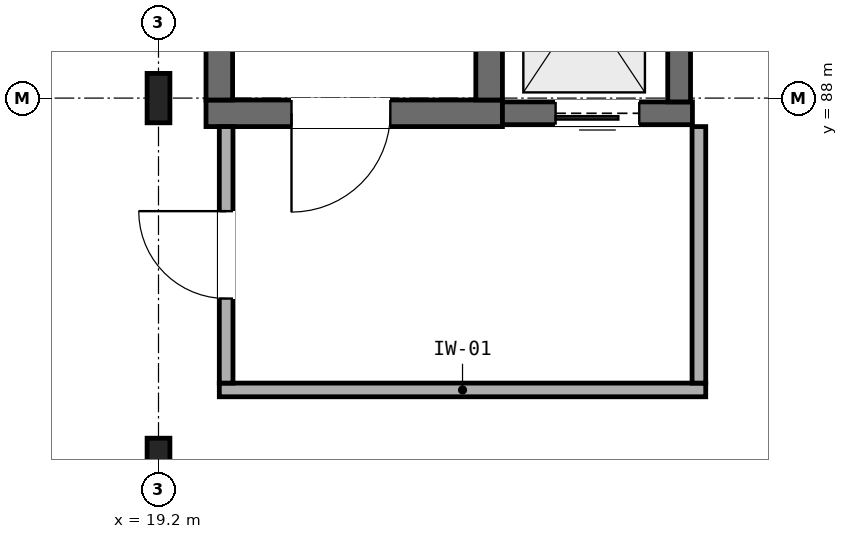
"""IFC4 building model, lengths in metres.
Left out: names, types, materials, properties, quantities, classifications, styles, units other than length and angle.
Written with IfcOpenShell. Run it as: python <this file> out.ifc"""

import sys

from ifc_helpers import new_model, si_unit, direction, frame, frame_2d, origin, origin_2d, place, context, subcontext, project, spatial, rectangle, i_section, extrude, element, fill, save


model = new_model("IFC4")
c1 = context("Model", 3, precision=1e-05, world=origin(), true_north=direction((0.0, 1.0)))
c2 = subcontext(c1, "Body", "Model", "MODEL_VIEW")
j1 = project(units=[si_unit("LENGTHUNIT", "METRE"), si_unit("PLANEANGLEUNIT", "RADIAN")], contexts=[c1])
p1 = place(None, origin())
s1 = spatial("IfcSite", under=j1, at=p1, CompositionType="ELEMENT")
p2 = place(p1, origin())
s2 = spatial("IfcBuilding", under=s1, at=p2, CompositionType="ELEMENT")
p3 = place(p2, frame((0.0, 0.0, -9.8)))
s3 = spatial("IfcBuildingStorey", under=s2, at=p3, CompositionType="ELEMENT", Elevation=-9.8)
for number, where, z_axis, x_axis in (
    (1, (19.2, 83.2, 0.0), (0.0, 0.0, 1.0), (1.0, 0.0, 0.0)),
    (2, (19.2, 88.0, 0.0), (0.0, 0.0, 1.0), (1.0, 0.0, 0.0)),
):
    element("IfcColumn", number, at=place(p3, frame(where, z_axis=z_axis, x_axis=x_axis)), inside=s3, PredefinedType="COLUMN", context=c2, shape_type="SweptSolid", body=[
        extrude(i_section(OverallWidth=0.3, OverallDepth=0.65, WebThickness=0.016, FlangeThickness=0.031, FilletRadius=0.027, at=origin_2d()), origin(), (0.0, 0.0, 1.0), 5.25),
    ])
p4 = place(p3, frame((19.825, 87.8, 0.0), z_axis=(0.0, 0.0, 1.0), x_axis=(1.0, 0.0, 0.0)))
e3 = element("IfcWall", 3, at=p4, inside=s3, PredefinedType="SHEAR", context=c2, shape_type="SweptSolid", body=[
    extrude(rectangle(XDim=3.9, YDim=0.35, at=frame_2d((1.95, 0.0))), origin(), (0.0, 0.0, 1.0), 4.97),
])
p5 = place(p4, frame((1.125, 0.0, 0.0)))
e4 = element("IfcOpeningElement", 4, at=p5, cuts=e3, PredefinedType="OPENING", context=c2, shape_type="SweptSolid", body=[
    extrude(rectangle(XDim=1.3, YDim=2.15, at=frame_2d((0.65, 1.075))), frame((0.0, 0.185, 0.0), z_axis=(0.0, -1.0, 0.0), x_axis=(1.0, 0.0, 0.0)), (0.0, 0.0, 1.0), 0.37),
])
for number, where, z_axis, x_axis in (
    (5, (20.0, 87.975, 0.0), (0.0, 0.0, 1.0), (0.0, 1.0, 0.0)),
    (6, (23.55, 87.975, 0.0), (0.0, 0.0, 1.0), (0.0, 1.0, 0.0)),
):
    element("IfcWall", number, at=place(p3, frame(where, z_axis=z_axis, x_axis=x_axis)), inside=s3, PredefinedType="SHEAR", context=c2, shape_type="SweptSolid", body=[
        extrude(rectangle(XDim=7.6, YDim=0.35, at=frame_2d((3.8, 0.0))), origin(), (0.0, 0.0, 1.0), 4.97),
    ])
p6 = place(p3, frame((23.725, 87.8, 0.0), z_axis=(0.0, 0.0, 1.0), x_axis=(1.0, 0.0, 0.0)))
e7 = element("IfcWall", 7, at=p6, inside=s3, PredefinedType="SHEAR", context=c2, shape_type="SweptSolid", body=[
    extrude(rectangle(XDim=2.5, YDim=0.3, at=frame_2d((1.25, 0.0))), origin(), (0.0, 0.0, 1.0), 4.97),
])
p7 = place(p6, frame((0.7, 0.0, 0.0)))
e8 = element("IfcOpeningElement", 8, at=p7, cuts=e7, PredefinedType="OPENING", context=c2, shape_type="SweptSolid", body=[
    extrude(rectangle(XDim=1.1, YDim=2.1, at=frame_2d((0.55, 1.05))), frame((0.0, 0.16, 0.0), z_axis=(0.0, -1.0, 0.0), x_axis=(1.0, 0.0, 0.0)), (0.0, 0.0, 1.0), 0.32),
])
p8 = place(p3, frame((26.05, 87.95, 0.0), z_axis=(0.0, 0.0, 1.0), x_axis=(0.0, 1.0, 0.0)))
e9 = element("IfcWall", 9, at=p8, inside=s3, PredefinedType="SHEAR", context=c2, shape_type="SweptSolid", body=[
    extrude(rectangle(XDim=2.65, YDim=0.3, at=frame_2d((1.325, 0.0))), origin(), (0.0, 0.0, 1.0), 4.97),
])
p9 = place(p3, frame((20.0, 84.16, 0.0), z_axis=(0.0, 0.0, 1.0), x_axis=(1.0, 0.0, 0.0)))
e10 = element("IfcWall", 10, at=p9, inside=s3, PredefinedType="PARTITIONING", context=c2, shape_type="SweptSolid", body=[
    extrude(rectangle(XDim=6.4, YDim=0.18, at=frame_2d((3.2, 0.0))), origin(), (0.0, 0.0, 1.0), 4.97),
])
p10 = place(p3, frame((20.09, 84.25, 0.0), z_axis=(0.0, 0.0, 1.0), x_axis=(0.0, 1.0, 0.0)))
e11 = element("IfcWall", 11, at=p10, inside=s3, PredefinedType="PARTITIONING", context=c2, shape_type="SweptSolid", body=[
    extrude(rectangle(XDim=3.375, YDim=0.18, at=frame_2d((1.688, 0.0))), origin(), (0.0, 0.0, 1.0), 4.97),
])
p11 = place(p10, frame((1.113, 0.0, 0.0)))
e12 = element("IfcOpeningElement", 12, at=p11, cuts=e11, PredefinedType="OPENING", context=c2, shape_type="SweptSolid", body=[
    extrude(rectangle(XDim=1.15, YDim=2.15, at=frame_2d((0.575, 1.075))), frame((0.0, 0.1, 0.0), z_axis=(0.0, -1.0, 0.0), x_axis=(1.0, 0.0, 0.0)), (0.0, 0.0, 1.0), 0.2),
])
p12 = place(p3, frame((26.31, 84.25, 0.0), z_axis=(0.0, 0.0, 1.0), x_axis=(0.0, 1.0, 0.0)))
e13 = element("IfcWall", 13, at=p12, inside=s3, PredefinedType="PARTITIONING", context=c2, shape_type="SweptSolid", body=[
    extrude(rectangle(XDim=3.375, YDim=0.18, at=frame_2d((1.688, 0.0))), origin(), (0.0, 0.0, 1.0), 4.97),
])
p13 = place(p5, frame((1.3, 0.0, 0.0), z_axis=(0.0, 0.0, 1.0), x_axis=(-1.0, 0.0, 0.0)))
e14 = element("IfcDoor", 14, at=p13, inside=s3, OperationType="SINGLE_SWING_LEFT", PredefinedType="DOOR", context=c2, shape_type="SweptSolid", body=[
    extrude(rectangle(XDim=1.3, YDim=2.15, at=frame_2d((0.65, 1.075))), frame((0.0, 0.025, 0.0), z_axis=(0.0, -1.0, 0.0), x_axis=(1.0, 0.0, 0.0)), (0.0, 0.0, 1.0), 0.05),
])
fill(e4, e14)
p14 = place(p7, frame((1.1, 0.0, 0.0), z_axis=(0.0, 0.0, 1.0), x_axis=(-1.0, 0.0, 0.0)))
e15 = element("IfcDoor", 15, at=p14, inside=s3, OperationType="SLIDING_TO_LEFT", PredefinedType="DOOR", context=c2, shape_type="SweptSolid", body=[
    extrude(rectangle(XDim=1.1, YDim=2.1, at=frame_2d((0.55, 1.05))), frame((0.0, 0.025, 0.0), z_axis=(0.0, -1.0, 0.0), x_axis=(1.0, 0.0, 0.0)), (0.0, 0.0, 1.0), 0.05),
])
fill(e8, e15)
p15 = place(p11, origin())
e16 = element("IfcDoor", 16, at=p15, inside=s3, OperationType="SINGLE_SWING_RIGHT", PredefinedType="DOOR", context=c2, shape_type="SweptSolid", body=[
    extrude(rectangle(XDim=1.15, YDim=2.15, at=frame_2d((0.575, 1.075))), frame((0.0, 0.025, 0.0), z_axis=(0.0, -1.0, 0.0), x_axis=(1.0, 0.0, 0.0)), (0.0, 0.0, 1.0), 0.05),
])
fill(e12, e16)
save(model, sys.argv[1])
